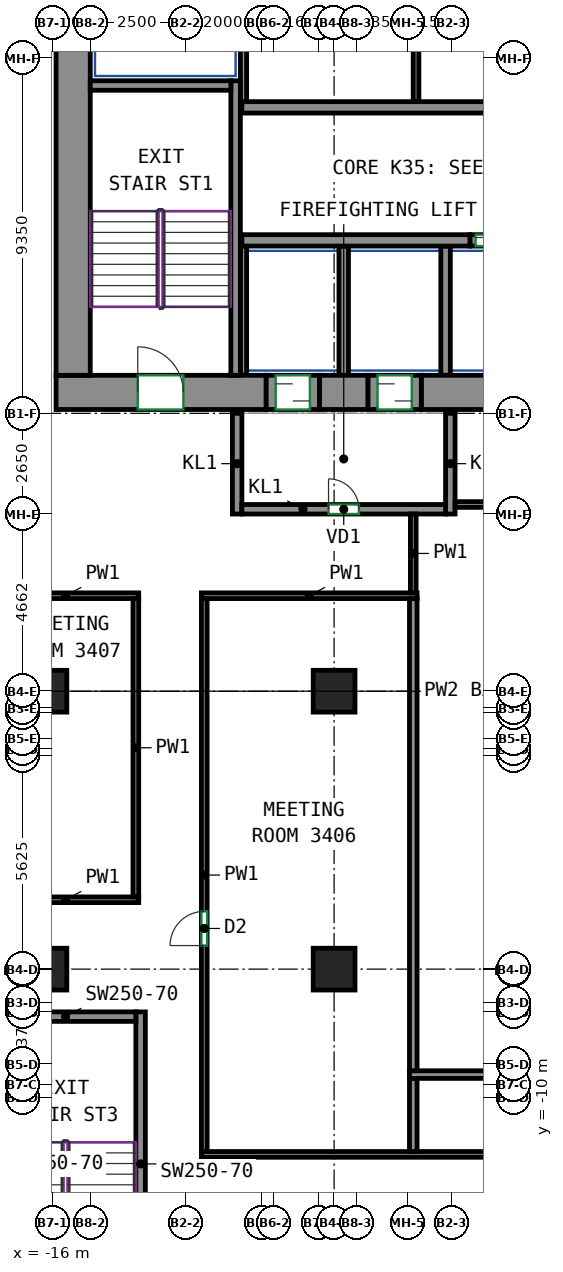
"""IFC4 building model, lengths in metres.
Left out: names, types, materials, properties, quantities, classifications, styles, units other than length and angle.
Written with IfcOpenShell. Run it as: python <this file> out.ifc"""

import sys

from ifc_helpers import new_model, si_unit, direction, frame, frame_2d, origin, origin_2d, place, context, subcontext, project, spatial, rectangle, extrude, source, transform, mapped, element, fill, save


model = new_model("IFC4")
c1 = context("Model", 3, precision=1e-05, world=origin(), true_north=direction((0.0, 1.0)))
c2 = subcontext(c1, "Body", "Model", "MODEL_VIEW")
j1 = project(units=[si_unit("LENGTHUNIT", "METRE"), si_unit("PLANEANGLEUNIT", "RADIAN")], contexts=[c1])
p1 = place(None, origin())
s1 = spatial("IfcSite", under=j1, at=p1, CompositionType="ELEMENT")
p2 = place(p1, origin())
s2 = spatial("IfcBuilding", under=s1, at=p2, CompositionType="ELEMENT")
p3 = place(p2, frame((0.0, 0.0, 150.7)))
s3 = spatial("IfcBuildingStorey", under=s2, at=p3, CompositionType="ELEMENT", Elevation=150.7)
m1 = source(origin(), c2, "Body", "SweptSolid", [
    extrude(rectangle(XDim=1.1, YDim=1.1, at=origin_2d()), origin(), (0.0, 0.0, 1.0), 3.12),
])
for number, where, z_axis, x_axis in (
    (1, (-16.167, -6.625, 0.0), (0.0, 0.0, 1.0), (1.0, 0.0, 0.0)),
    (2, (-16.167, 0.688, 0.0), (0.0, 0.0, 1.0), (1.0, 0.0, 0.0)),
    (3, (-8.583, -6.625, 0.0), (0.0, 0.0, 1.0), (1.0, 0.0, 0.0)),
    (4, (-8.583, 0.688, 0.0), (0.0, 0.0, 1.0), (1.0, 0.0, 0.0)),
):
    element("IfcColumn", number, at=place(p3, frame(where, z_axis=z_axis, x_axis=x_axis)), inside=s3, PredefinedType="COLUMN", context=c2, shape_type="MappedRepresentation", body=[
        mapped(m1, transform((0.0, 0.0, 0.0))),
    ])
m2 = source(origin(), c2, "Body", "SweptSolid", [
    extrude(rectangle(XDim=5.53, YDim=0.9, at=frame_2d((2.765, 0.0))), origin(), (0.0, 0.0, 1.0), 3.12),
])
p4 = place(p3, frame((-15.9, 8.55, 0.0), z_axis=(0.0, 0.0, 1.0), x_axis=(1.0, 0.0, 0.0)))
e5 = element("IfcWall", 5, at=p4, inside=s3, PredefinedType="SHEAR", context=c2, shape_type="MappedRepresentation", body=[
    mapped(m2, transform((0.0, 0.0, 0.0))),
])
p5 = place(p4, frame((2.15, 0.0, 0.0)))
e6 = element("IfcOpeningElement", 6, at=p5, cuts=e5, PredefinedType="OPENING", context=c2, shape_type="SweptSolid", body=[
    extrude(rectangle(XDim=1.2, YDim=2.1, at=frame_2d((0.6, 1.05))), frame((0.0, 0.46, 0.0), z_axis=(0.0, -1.0, 0.0), x_axis=(1.0, 0.0, 0.0)), (0.0, 0.0, 1.0), 0.92),
])
m3 = source(origin(), c2, "Body", "SweptSolid", [
    extrude(rectangle(XDim=1.28, YDim=0.9, at=frame_2d((0.64, 0.0))), origin(), (0.0, 0.0, 1.0), 3.12),
])
p6 = place(p3, frame((-8.97, 8.55, 0.0), z_axis=(0.0, 0.0, 1.0), x_axis=(1.0, 0.0, 0.0)))
e7 = element("IfcWall", 7, at=p6, inside=s3, PredefinedType="SHEAR", context=c2, shape_type="MappedRepresentation", body=[
    mapped(m3, transform((0.0, 0.0, 0.0))),
])
m4 = source(origin(), c2, "Body", "SweptSolid", [
    extrude(rectangle(XDim=14.18, YDim=0.9, at=frame_2d((7.09, 0.0))), origin(), (0.0, 0.0, 1.0), 3.12),
])
p7 = place(p3, frame((-6.29, 8.55, 0.0), z_axis=(0.0, 0.0, 1.0), x_axis=(1.0, 0.0, 0.0)))
e8 = element("IfcWall", 8, at=p7, inside=s3, PredefinedType="SHEAR", context=c2, shape_type="MappedRepresentation", body=[
    mapped(m4, transform((0.0, 0.0, 0.0))),
])
m5 = source(origin(), c2, "Body", "SweptSolid", [
    extrude(rectangle(XDim=12.0, YDim=0.9, at=frame_2d((6.0, 0.0))), origin(), (0.0, 0.0, 1.0), 3.12),
])
p8 = place(p3, frame((-15.45, 9.0, 0.0), z_axis=(0.0, 0.0, 1.0), x_axis=(0.0, 1.0, 0.0)))
e9 = element("IfcWall", 9, at=p8, inside=s3, PredefinedType="SHEAR", context=c2, shape_type="MappedRepresentation", body=[
    mapped(m5, transform((0.0, 0.0, 0.0))),
])
m6 = source(origin(), c2, "Body", "SweptSolid", [
    extrude(rectangle(XDim=7.75, YDim=0.25, at=frame_2d((3.875, 0.0))), origin(), (0.0, 0.0, 1.0), 3.12),
])
p9 = place(p3, frame((-11.175, 9.0, 0.0), z_axis=(0.0, 0.0, 1.0), x_axis=(0.0, 1.0, 0.0)))
e10 = element("IfcWall", 10, at=p9, inside=s3, PredefinedType="SHEAR", context=c2, shape_type="MappedRepresentation", body=[
    mapped(m6, transform((0.0, 0.0, 0.0))),
])
m7 = source(origin(), c2, "Body", "SweptSolid", [
    extrude(rectangle(XDim=3.7, YDim=0.25, at=frame_2d((1.85, 0.0))), origin(), (0.0, 0.0, 1.0), 3.12),
])
p10 = place(p3, frame((-15.0, 16.625, 0.0), z_axis=(0.0, 0.0, 1.0), x_axis=(1.0, 0.0, 0.0)))
e11 = element("IfcWall", 11, at=p10, inside=s3, PredefinedType="SHEAR", context=c2, shape_type="MappedRepresentation", body=[
    mapped(m7, transform((0.0, 0.0, 0.0))),
])
m8 = source(origin(), c2, "Body", "SweptSolid", [
    extrude(rectangle(XDim=8.0, YDim=0.25, at=frame_2d((4.0, 0.0))), origin(), (0.0, 0.0, 1.0), 3.12),
])
p11 = place(p3, frame((-13.675, -15.75, 0.0), z_axis=(0.0, 0.0, 1.0), x_axis=(0.0, 1.0, 0.0)))
e12 = element("IfcWall", 12, at=p11, inside=s3, PredefinedType="SHEAR", context=c2, shape_type="MappedRepresentation", body=[
    mapped(m8, transform((0.0, 0.0, 0.0))),
])
p12 = place(p3, frame((-17.5, -7.875, 0.0), z_axis=(0.0, 0.0, 1.0), x_axis=(1.0, 0.0, 0.0)))
e13 = element("IfcWall", 13, at=p12, inside=s3, PredefinedType="SHEAR", context=c2, shape_type="MappedRepresentation", body=[
    mapped(m7, transform((0.0, 0.0, 0.0))),
])
m9 = source(origin(), c2, "Body", "SweptSolid", [
    extrude(rectangle(XDim=6.0, YDim=0.3, at=frame_2d((3.0, 0.0))), origin(), (0.0, 0.0, 1.0), 3.12),
])
p13 = place(p3, frame((-11.01, 12.55, 0.0), z_axis=(0.0, 0.0, 1.0), x_axis=(1.0, 0.0, 0.0)))
e14 = element("IfcWall", 14, at=p13, inside=s3, PredefinedType="SHEAR", context=c2, shape_type="MappedRepresentation", body=[
    mapped(m9, transform((0.0, 0.0, 0.0))),
])
m10 = source(origin(), c2, "Body", "SweptSolid", [
    extrude(rectangle(XDim=14.04, YDim=0.3, at=frame_2d((7.02, 0.0))), origin(), (0.0, 0.0, 1.0), 3.12),
])
p14 = place(p3, frame((-11.01, 16.05, 0.0), z_axis=(0.0, 0.0, 1.0), x_axis=(1.0, 0.0, 0.0)))
e15 = element("IfcWall", 15, at=p14, inside=s3, PredefinedType="SHEAR", context=c2, shape_type="MappedRepresentation", body=[
    mapped(m10, transform((0.0, 0.0, 0.0))),
])
m11 = source(origin(), c2, "Body", "SweptSolid", [
    extrude(rectangle(XDim=1.4, YDim=0.3, at=frame_2d((0.7, 0.0))), origin(), (0.0, 0.0, 1.0), 3.12),
])
p15 = place(p3, frame((-5.01, 12.55, 0.0), z_axis=(0.0, 0.0, 1.0), x_axis=(1.0, 0.0, 0.0)))
e16 = element("IfcWall", 16, at=p15, inside=s3, PredefinedType="PARTITIONING", context=c2, shape_type="MappedRepresentation", body=[
    mapped(m11, transform((0.0, 0.0, 0.0))),
])
p16 = place(p15, frame((0.15, 0.0, 0.0)))
e17 = element("IfcOpeningElement", 17, at=p16, cuts=e16, PredefinedType="OPENING", context=c2, shape_type="SweptSolid", body=[
    extrude(rectangle(XDim=1.1, YDim=2.1, at=frame_2d((0.55, 1.05))), frame((0.0, 0.16, 0.0), z_axis=(0.0, -1.0, 0.0), x_axis=(1.0, 0.0, 0.0)), (0.0, 0.0, 1.0), 0.32),
])
m12 = source(origin(), c2, "Body", "SweptSolid", [
    extrude(rectangle(XDim=2.65, YDim=0.25, at=frame_2d((1.325, 0.0))), origin(), (0.0, 0.0, 1.0), 3.12),
])
for number, where, z_axis, x_axis in (
    (18, (-11.135, 5.35, 0.0), (0.0, 0.0, 1.0), (0.0, 1.0, 0.0)),
    (19, (-5.525, 5.35, 0.0), (0.0, 0.0, 1.0), (0.0, 1.0, 0.0)),
):
    element("IfcWall", number, at=place(p3, frame(where, z_axis=z_axis, x_axis=x_axis)), inside=s3, PredefinedType="PARTITIONING", context=c2, shape_type="MappedRepresentation", body=[
        mapped(m12, transform((0.0, 0.0, 0.0))),
    ])
m13 = source(origin(), c2, "Body", "SweptSolid", [
    extrude(rectangle(XDim=5.36, YDim=0.25, at=frame_2d((2.68, 0.0))), origin(), (0.0, 0.0, 1.0), 3.12),
])
p17 = place(p3, frame((-11.01, 5.475, 0.0), z_axis=(0.0, 0.0, 1.0), x_axis=(1.0, 0.0, 0.0)))
e20 = element("IfcWall", 20, at=p17, inside=s3, PredefinedType="PARTITIONING", context=c2, shape_type="MappedRepresentation", body=[
    mapped(m13, transform((0.0, 0.0, 0.0))),
])
p18 = place(p17, frame((2.28, 0.0, 0.0)))
e21 = element("IfcOpeningElement", 21, at=p18, cuts=e20, PredefinedType="OPENING", context=c2, shape_type="SweptSolid", body=[
    extrude(rectangle(XDim=0.8, YDim=2.0, at=frame_2d((0.4, 1.0))), frame((0.0, 0.135, 0.0), z_axis=(0.0, -1.0, 0.0), x_axis=(1.0, 0.0, 0.0)), (0.0, 0.0, 1.0), 0.27),
])
m14 = source(origin(), c2, "Body", "SweptSolid", [
    extrude(rectangle(XDim=4.8, YDim=0.165, at=frame_2d((2.4, 0.0))), origin(), (0.0, 0.0, 1.0), 3.12),
])
p19 = place(p3, frame((-10.968, 16.2, 0.0), z_axis=(0.0, 0.0, 1.0), x_axis=(0.0, 1.0, 0.0)))
e22 = element("IfcWall", 22, at=p19, inside=s3, PredefinedType="PARTITIONING", context=c2, shape_type="MappedRepresentation", body=[
    mapped(m14, transform((0.0, 0.0, 0.0))),
])
m15 = source(origin(), c2, "Body", "SweptSolid", [
    extrude(rectangle(XDim=3.4, YDim=0.165, at=frame_2d((1.7, 0.0))), origin(), (0.0, 0.0, 1.0), 3.12),
])
p20 = place(p3, frame((-10.968, 9.0, 0.0), z_axis=(0.0, 0.0, 1.0), x_axis=(0.0, 1.0, 0.0)))
e23 = element("IfcWall", 23, at=p20, inside=s3, PredefinedType="PARTITIONING", context=c2, shape_type="MappedRepresentation", body=[
    mapped(m15, transform((0.0, 0.0, 0.0))),
])
m16 = source(origin(), c2, "Body", "SweptSolid", [
    extrude(rectangle(XDim=3.4, YDim=0.25, at=frame_2d((1.7, 0.0))), origin(), (0.0, 0.0, 1.0), 3.12),
])
for number, where, z_axis, x_axis in (
    (24, (-5.65, 9.0, 0.0), (0.0, 0.0, 1.0), (0.0, 1.0, 0.0)),
    (25, (-8.33, 9.0, 0.0), (0.0, 0.0, 1.0), (0.0, 1.0, 0.0)),
):
    element("IfcWall", number, at=place(p3, frame(where, z_axis=z_axis, x_axis=x_axis)), inside=s3, PredefinedType="PARTITIONING", context=c2, shape_type="MappedRepresentation", body=[
        mapped(m16, transform((0.0, 0.0, 0.0))),
    ])
m17 = source(origin(), c2, "Body", "SweptSolid", [
    extrude(rectangle(XDim=4.8, YDim=0.15, at=frame_2d((2.4, 0.0))), origin(), (0.0, 0.0, 1.0), 3.12),
])
p21 = place(p3, frame((-6.427, 16.2, 0.0), z_axis=(0.0, 0.0, 1.0), x_axis=(0.0, 1.0, 0.0)))
e26 = element("IfcWall", 26, at=p21, inside=s3, PredefinedType="PARTITIONING", context=c2, shape_type="MappedRepresentation", body=[
    mapped(m17, transform((0.0, 0.0, 0.0))),
])
m18 = source(origin(), c2, "Body", "SweptSolid", [
    extrude(rectangle(XDim=1.4, YDim=0.9, at=frame_2d((0.7, 0.0))), origin(), (0.0, 0.0, 1.0), 2.7),
])
p22 = place(p3, frame((-10.37, 8.55, 0.0), z_axis=(0.0, 0.0, 1.0), x_axis=(1.0, 0.0, 0.0)))
e27 = element("IfcWall", 27, at=p22, inside=s3, PredefinedType="PARTITIONING", context=c2, shape_type="MappedRepresentation", body=[
    mapped(m18, transform((0.0, 0.0, 0.0))),
])
p23 = place(p22, frame((0.25, 0.0, 0.0)))
e28 = element("IfcOpeningElement", 28, at=p23, cuts=e27, PredefinedType="OPENING", context=c2, shape_type="SweptSolid", body=[
    extrude(rectangle(XDim=0.9, YDim=2.1, at=frame_2d((0.45, 1.05))), frame((0.0, 0.46, 0.0), z_axis=(0.0, -1.0, 0.0), x_axis=(1.0, 0.0, 0.0)), (0.0, 0.0, 1.0), 0.92),
])
m19 = source(origin(), c2, "Body", "SweptSolid", [
    extrude(rectangle(XDim=1.4, YDim=0.9, at=frame_2d((0.7, 0.0))), origin(), (0.0, 0.0, 1.0), 2.7),
])
p24 = place(p3, frame((-7.69, 8.55, 0.0), z_axis=(0.0, 0.0, 1.0), x_axis=(1.0, 0.0, 0.0)))
e29 = element("IfcWall", 29, at=p24, inside=s3, PredefinedType="PARTITIONING", context=c2, shape_type="MappedRepresentation", body=[
    mapped(m19, transform((0.0, 0.0, 0.0))),
])
p25 = place(p24, frame((0.25, 0.0, 0.0)))
e30 = element("IfcOpeningElement", 30, at=p25, cuts=e29, PredefinedType="OPENING", context=c2, shape_type="SweptSolid", body=[
    extrude(rectangle(XDim=0.9, YDim=2.1, at=frame_2d((0.45, 1.05))), frame((0.0, 0.46, 0.0), z_axis=(0.0, -1.0, 0.0), x_axis=(1.0, 0.0, 0.0)), (0.0, 0.0, 1.0), 0.92),
])
p26 = place(p3, frame((-12.075, 3.2, 0.0), z_axis=(0.0, 0.0, 1.0), x_axis=(1.0, 0.0, 0.0)))
e31 = element("IfcWall", 31, at=p26, inside=s3, PredefinedType="PARTITIONING", context=c2, shape_type="SweptSolid", body=[
    extrude(rectangle(XDim=5.675, YDim=0.15, at=frame_2d((2.837, 0.0))), origin(), (0.0, 0.0, 1.0), 3.12),
])
p27 = place(p3, frame((-12.0, -11.425, 0.0), z_axis=(0.0, 0.0, 1.0), x_axis=(0.0, 1.0, 0.0)))
e32 = element("IfcWall", 32, at=p27, inside=s3, PredefinedType="PARTITIONING", context=c2, shape_type="SweptSolid", body=[
    extrude(rectangle(XDim=14.55, YDim=0.15, at=frame_2d((7.275, 0.0))), origin(), (0.0, 0.0, 1.0), 3.12),
])
p28 = place(p27, frame((5.42, 0.0, 0.0)))
e33 = element("IfcOpeningElement", 33, at=p28, cuts=e32, PredefinedType="OPENING", context=c2, shape_type="SweptSolid", body=[
    extrude(rectangle(XDim=0.9, YDim=2.1, at=frame_2d((0.45, 1.05))), frame((0.0, 0.085, 0.0), z_axis=(0.0, -1.0, 0.0), x_axis=(1.0, 0.0, 0.0)), (0.0, 0.0, 1.0), 0.17),
])
p29 = place(p3, frame((-12.075, -11.5, 0.0), z_axis=(0.0, 0.0, 1.0), x_axis=(1.0, 0.0, 0.0)))
e34 = element("IfcWall", 34, at=p29, inside=s3, PredefinedType="PARTITIONING", context=c2, shape_type="SweptSolid", body=[
    extrude(rectangle(XDim=28.35, YDim=0.15, at=frame_2d((14.175, 0.0))), origin(), (0.0, 0.0, 1.0), 3.12),
])
p30 = place(p29, frame((11.273, 0.0, 0.0)))
e35 = element("IfcOpeningElement", 35, at=p30, cuts=e34, PredefinedType="OPENING", context=c2, shape_type="SweptSolid", body=[
    extrude(rectangle(XDim=0.9, YDim=2.1, at=frame_2d((0.45, 1.05))), frame((0.0, 0.085, 0.0), z_axis=(0.0, -1.0, 0.0), x_axis=(1.0, 0.0, 0.0)), (0.0, 0.0, 1.0), 0.17),
])
for number, where, z_axis, x_axis in (
    (36, (-17.575, 3.2, 0.0), (0.0, 0.0, 1.0), (1.0, 0.0, 0.0)),
    (37, (-13.725, -4.8, 0.0), (0.0, 0.0, 1.0), (-1.0, 0.0, 0.0)),
):
    element("IfcWall", number, at=place(p3, frame(where, z_axis=z_axis, x_axis=x_axis)), inside=s3, PredefinedType="PARTITIONING", context=c2, shape_type="SweptSolid", body=[
        extrude(rectangle(XDim=3.85, YDim=0.15, at=frame_2d((1.925, 0.0))), origin(), (0.0, 0.0, 1.0), 3.12),
    ])
p31 = place(p3, frame((-13.8, 3.125, 0.0), z_axis=(0.0, 0.0, 1.0), x_axis=(0.0, -1.0, 0.0)))
e38 = element("IfcWall", 38, at=p31, inside=s3, PredefinedType="PARTITIONING", context=c2, shape_type="SweptSolid", body=[
    extrude(rectangle(XDim=7.85, YDim=0.15, at=frame_2d((3.925, 0.0))), origin(), (0.0, 0.0, 1.0), 3.12),
])
p32 = place(p3, frame((-6.5, 3.275, 0.0), z_axis=(0.0, 0.0, 1.0), x_axis=(0.0, 1.0, 0.0)))
e39 = element("IfcWall", 39, at=p32, inside=s3, PredefinedType="PARTITIONING", context=c2, shape_type="SweptSolid", body=[
    extrude(rectangle(XDim=2.075, YDim=0.15, at=frame_2d((1.038, 0.0))), origin(), (0.0, 0.0, 1.0), 3.12),
])
p33 = place(p3, frame((-5.4, 5.6, 0.0), z_axis=(0.0, 0.0, 1.0), x_axis=(1.0, 0.0, 0.0)))
e40 = element("IfcWall", 40, at=p33, inside=s3, PredefinedType="PARTITIONING", context=c2, shape_type="SweptSolid", body=[
    extrude(rectangle(XDim=13.975, YDim=0.15, at=frame_2d((6.987, 0.0))), origin(), (0.0, 0.0, 1.0), 3.12),
])
p34 = place(p33, frame((4.626, 0.0, 0.0)))
e41 = element("IfcOpeningElement", 41, at=p34, cuts=e40, PredefinedType="OPENING", context=c2, shape_type="SweptSolid", body=[
    extrude(rectangle(XDim=1.0, YDim=2.1, at=frame_2d((0.5, 1.05))), frame((0.0, 0.085, 0.0), z_axis=(0.0, -1.0, 0.0), x_axis=(1.0, 0.0, 0.0)), (0.0, 0.0, 1.0), 0.17),
])
p35 = place(p3, frame((-6.5, -11.423, 0.0), z_axis=(0.0, 0.0, 1.0), x_axis=(0.0, 1.0, 0.0)))
e42 = element("IfcWall", 42, at=p35, inside=s3, PredefinedType="PARTITIONING", context=c2, shape_type="SweptSolid", body=[
    extrude(rectangle(XDim=1.933, YDim=0.2, at=frame_2d((0.967, 0.0))), origin(), (0.0, 0.0, 1.0), 3.12),
])
p36 = place(p3, frame((-6.5, -9.31, 0.0), z_axis=(0.0, 0.0, 1.0), x_axis=(0.0, 1.0, 0.0)))
e43 = element("IfcWall", 43, at=p36, inside=s3, PredefinedType="PARTITIONING", context=c2, shape_type="SweptSolid", body=[
    extrude(rectangle(XDim=12.433, YDim=0.2, at=frame_2d((6.217, 0.0))), origin(), (0.0, 0.0, 1.0), 3.12),
])
p37 = place(p3, frame((8.6, -9.4, 0.0), z_axis=(0.0, 0.0, 1.0), x_axis=(-1.0, 0.0, 0.0)))
e44 = element("IfcWall", 44, at=p37, inside=s3, PredefinedType="PARTITIONING", context=c2, shape_type="SweptSolid", body=[
    extrude(rectangle(XDim=15.2, YDim=0.2, at=frame_2d((7.6, 0.0))), origin(), (0.0, 0.0, 1.0), 3.12),
])
p38 = place(p18, origin())
e45 = element("IfcDoor", 45, at=p38, inside=s3, OperationType="SINGLE_SWING_LEFT", PredefinedType="DOOR", context=c2, shape_type="SweptSolid", body=[
    extrude(rectangle(XDim=0.8, YDim=2.0, at=frame_2d((0.4, 1.0))), frame((0.0, 0.025, 0.0), z_axis=(0.0, -1.0, 0.0), x_axis=(1.0, 0.0, 0.0)), (0.0, 0.0, 1.0), 0.05),
])
fill(e21, e45)
p39 = place(p23, origin())
e46 = element("IfcDoor", 46, at=p39, inside=s3, OperationType="SLIDING_TO_LEFT", PredefinedType="DOOR", context=c2, shape_type="SweptSolid", body=[
    extrude(rectangle(XDim=0.9, YDim=2.1, at=frame_2d((0.45, 1.05))), frame((0.0, 0.355, 0.0), z_axis=(0.0, -1.0, 0.0), x_axis=(1.0, 0.0, 0.0)), (0.0, 0.0, 1.0), 0.05),
])
fill(e28, e46)
p40 = place(p25, origin())
e47 = element("IfcDoor", 47, at=p40, inside=s3, OperationType="SLIDING_TO_RIGHT", PredefinedType="DOOR", context=c2, shape_type="SweptSolid", body=[
    extrude(rectangle(XDim=0.9, YDim=2.1, at=frame_2d((0.45, 1.05))), frame((0.0, 0.355, 0.0), z_axis=(0.0, -1.0, 0.0), x_axis=(1.0, 0.0, 0.0)), (0.0, 0.0, 1.0), 0.05),
])
fill(e30, e47)
p41 = place(p16, origin())
e48 = element("IfcDoor", 48, at=p41, inside=s3, OperationType="DOUBLE_DOOR_SLIDING", PredefinedType="DOOR", context=c2, shape_type="SweptSolid", body=[
    extrude(rectangle(XDim=1.1, YDim=2.1, at=frame_2d((0.55, 1.05))), frame((0.0, 0.025, 0.0), z_axis=(0.0, -1.0, 0.0), x_axis=(1.0, 0.0, 0.0)), (0.0, 0.0, 1.0), 0.05),
])
fill(e17, e48)
p42 = place(p5, origin())
e49 = element("IfcDoor", 49, at=p42, inside=s3, OperationType="DOUBLE_DOOR_SINGLE_SWING", PredefinedType="DOOR", context=c2, shape_type="SweptSolid", body=[
    extrude(rectangle(XDim=1.2, YDim=2.1, at=frame_2d((0.6, 1.05))), frame((0.0, 0.355, 0.0), z_axis=(0.0, -1.0, 0.0), x_axis=(1.0, 0.0, 0.0)), (0.0, 0.0, 1.0), 0.05),
])
fill(e6, e49)
p43 = place(p28, origin())
e50 = element("IfcDoor", 50, at=p43, inside=s3, OperationType="SINGLE_SWING_LEFT", PredefinedType="DOOR", context=c2, shape_type="SweptSolid", body=[
    extrude(rectangle(XDim=0.9, YDim=2.1, at=frame_2d((0.45, 1.05))), frame((0.0, 0.025, 0.0), z_axis=(0.0, -1.0, 0.0), x_axis=(1.0, 0.0, 0.0)), (0.0, 0.0, 1.0), 0.05),
])
fill(e33, e50)
save(model, sys.argv[1])
